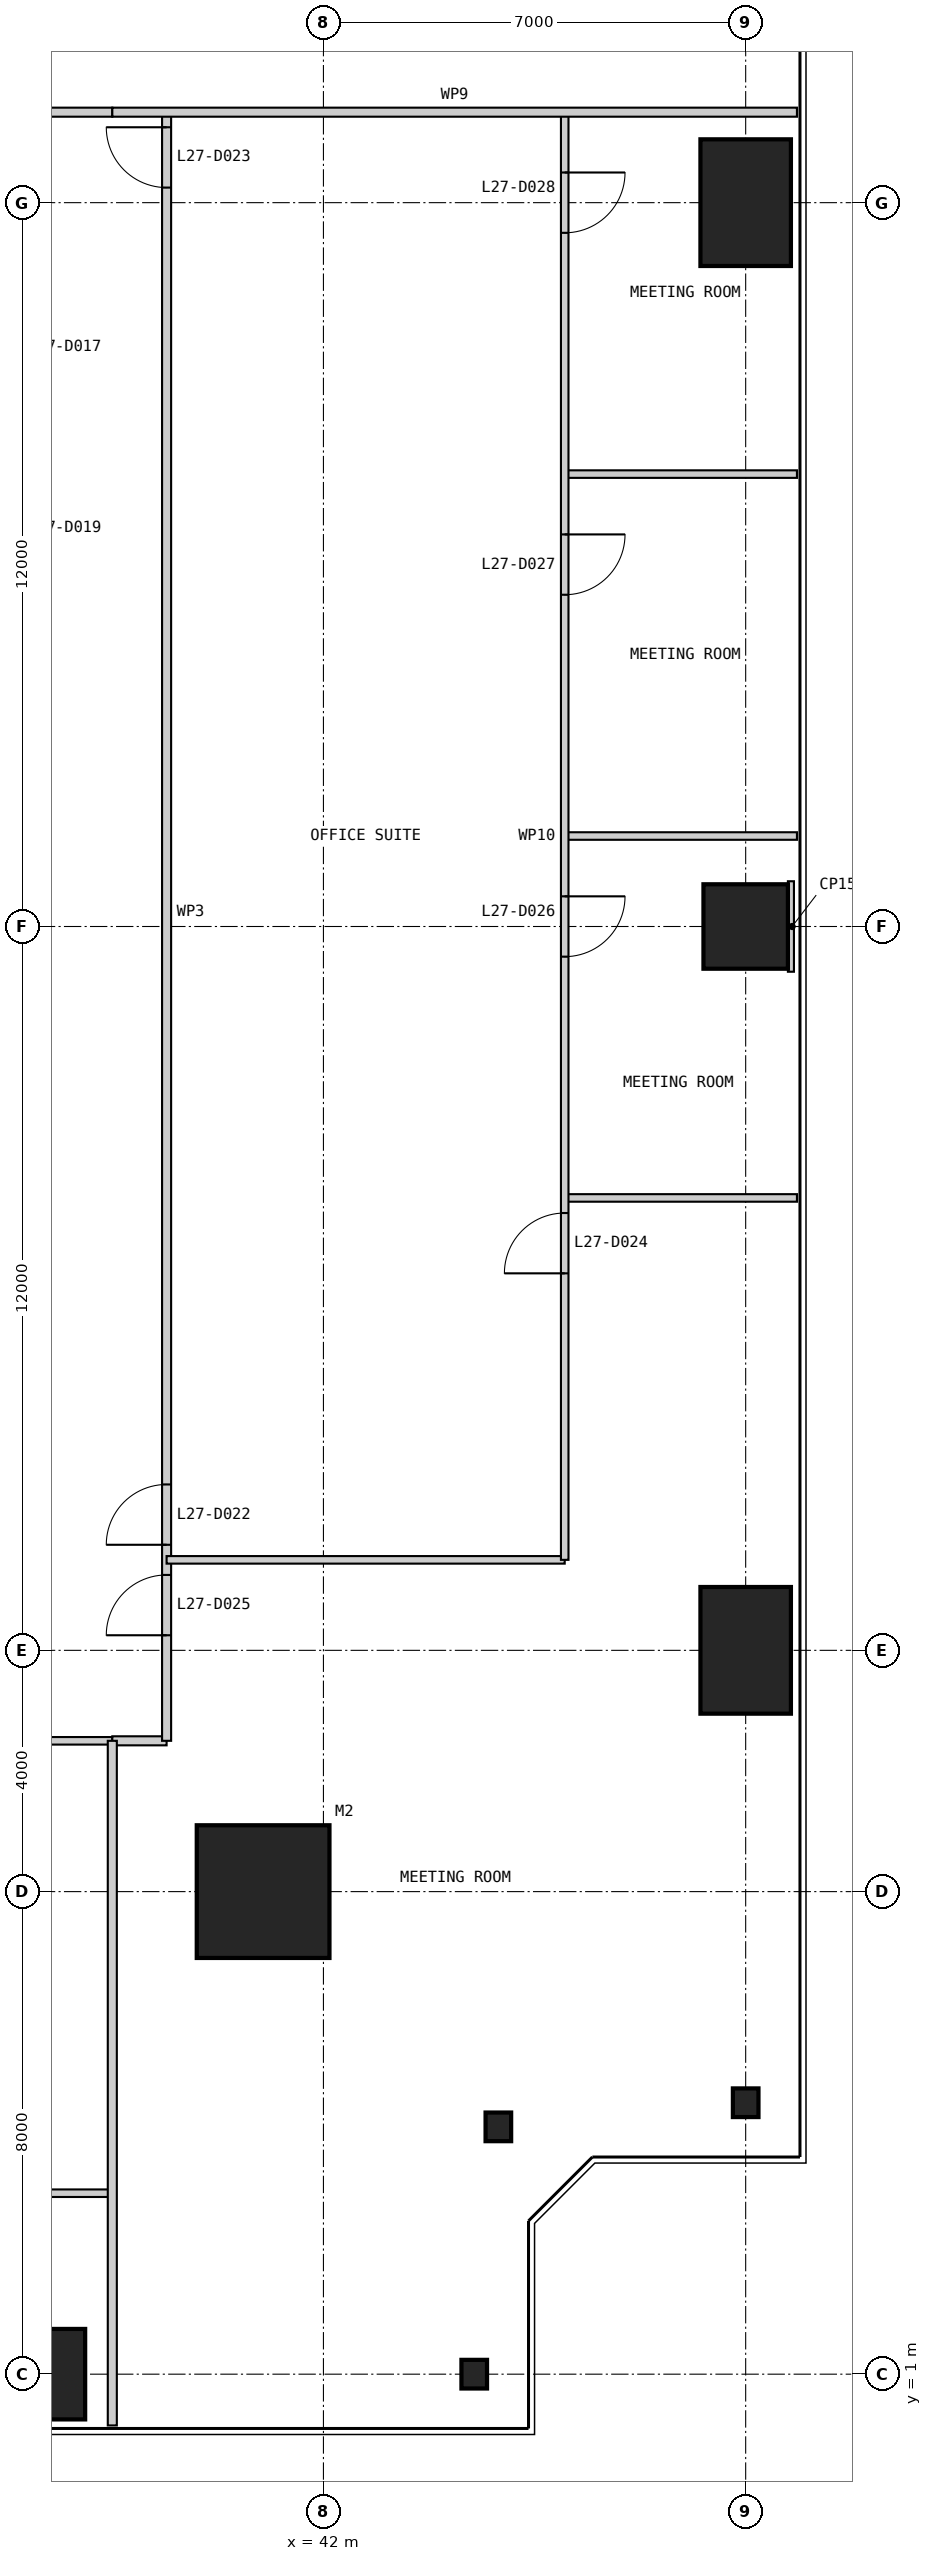
"""IFC4 building model, lengths in metres.
Left out: names, types, materials, properties, quantities, classifications, styles, units other than length and angle.
Written with IfcOpenShell. Run it as: python <this file> out.ifc"""

import sys

from ifc_helpers import new_model, si_unit, direction, frame, frame_2d, origin, origin_2d, place, context, subcontext, project, spatial, rectangle, i_section, extrude, element, fill, save


model = new_model("IFC4")
c1 = context("Model", 3, precision=1e-05, world=origin(), true_north=direction((0.0, 1.0)))
c2 = subcontext(c1, "Body", "Model", "MODEL_VIEW")
j1 = project(units=[si_unit("LENGTHUNIT", "METRE"), si_unit("PLANEANGLEUNIT", "RADIAN")], contexts=[c1])
p1 = place(None, origin())
s1 = spatial("IfcSite", under=j1, at=p1, CompositionType="ELEMENT")
p2 = place(p1, origin())
s2 = spatial("IfcBuilding", under=s1, at=p2, CompositionType="ELEMENT")
p3 = place(p2, frame((0.0, 0.0, 118.4)))
s3 = spatial("IfcBuildingStorey", under=s2, at=p3, CompositionType="ELEMENT", Elevation=118.4)
p4 = place(p3, frame((41.0, 9.0, 0.0), z_axis=(0.0, 0.0, 1.0), x_axis=(1.0, 0.0, 0.0)))
e1 = element("IfcColumn", 1, at=p4, inside=s3, PredefinedType="COLUMN", context=c2, shape_type="SweptSolid", body=[
    extrude(rectangle(XDim=2.2, YDim=2.2, at=origin_2d()), origin(), (0.0, 0.0, 1.0), 4.0),
])
p5 = place(p3, frame((37.0, 1.0, 0.0), z_axis=(0.0, 0.0, 1.0), x_axis=(1.0, 0.0, 0.0)))
e2 = element("IfcColumn", 2, at=p5, inside=s3, PredefinedType="COLUMN", context=c2, shape_type="SweptSolid", body=[
    extrude(rectangle(XDim=2.1, YDim=1.5, at=origin_2d()), origin(), (0.0, 0.0, 1.0), 4.0),
])
for number, where, z_axis, x_axis in (
    (3, (44.5, 1.0, 0.0), (0.0, 0.0, 1.0), (1.0, 0.0, 0.0)),
    (4, (44.9, 5.1, 0.0), (0.0, 0.0, 1.0), (1.0, 0.0, 0.0)),
    (5, (49.0, 5.5, 0.0), (0.0, 0.0, 1.0), (1.0, 0.0, 0.0)),
):
    element("IfcColumn", number, at=place(p3, frame(where, z_axis=z_axis, x_axis=x_axis)), inside=s3, PredefinedType="COLUMN", context=c2, shape_type="SweptSolid", body=[
        extrude(i_section(OverallWidth=0.424, OverallDepth=0.475, WebThickness=0.048, FlangeThickness=0.077, at=origin_2d()), origin(), (0.0, 0.0, 1.0), 4.0),
    ])
p6 = place(p3, frame((49.0, 13.0, 0.0), z_axis=(0.0, 0.0, 1.0), x_axis=(1.0, 0.0, 0.0)))
e6 = element("IfcColumn", 6, at=p6, inside=s3, PredefinedType="COLUMN", context=c2, shape_type="SweptSolid", body=[
    extrude(rectangle(XDim=1.5, YDim=2.1, at=origin_2d()), origin(), (0.0, 0.0, 1.0), 4.0),
])
p7 = place(p3, frame((49.0, 25.0, 0.0), z_axis=(0.0, 0.0, 1.0), x_axis=(1.0, 0.0, 0.0)))
e7 = element("IfcColumn", 7, at=p7, inside=s3, PredefinedType="COLUMN", context=c2, shape_type="SweptSolid", body=[
    extrude(rectangle(XDim=1.4, YDim=1.4, at=origin_2d()), origin(), (0.0, 0.0, 1.0), 4.0),
])
p8 = place(p3, frame((49.0, 37.0, 0.0), z_axis=(0.0, 0.0, 1.0), x_axis=(1.0, 0.0, 0.0)))
e8 = element("IfcColumn", 8, at=p8, inside=s3, PredefinedType="COLUMN", context=c2, shape_type="SweptSolid", body=[
    extrude(rectangle(XDim=1.5, YDim=2.1, at=origin_2d()), origin(), (0.0, 0.0, 1.0), 4.0),
])
p9 = place(p3, frame((32.5, 4.0, 0.0), z_axis=(0.0, 0.0, 1.0), x_axis=(1.0, 0.0, 0.0)))
e9 = element("IfcWall", 9, at=p9, inside=s3, PredefinedType="PARTITIONING", context=c2, shape_type="SweptSolid", body=[
    extrude(rectangle(XDim=6.0, YDim=0.125, at=frame_2d((3.0, 0.0))), origin(), (0.0, 0.0, 1.0), 3.85),
])
p10 = place(p3, frame((35.5, 11.5, 0.0), z_axis=(0.0, 0.0, 1.0), x_axis=(1.0, 0.0, 0.0)))
e10 = element("IfcWall", 10, at=p10, inside=s3, PredefinedType="PARTITIONING", context=c2, shape_type="SweptSolid", body=[
    extrude(rectangle(XDim=3.0, YDim=0.125, at=frame_2d((1.5, 0.0))), origin(), (0.0, 0.0, 1.0), 3.85),
])
p11 = place(p3, frame((38.5, 11.5, 0.0), z_axis=(0.0, 0.0, 1.0), x_axis=(1.0, 0.0, 0.0)))
e11 = element("IfcWall", 11, at=p11, inside=s3, PredefinedType="PARTITIONING", context=c2, shape_type="SweptSolid", body=[
    extrude(rectangle(XDim=0.9, YDim=0.15, at=frame_2d((0.45, 0.0))), origin(), (0.0, 0.0, 1.0), 3.85),
])
p12 = place(p3, frame((39.4, 11.5, 0.0), z_axis=(0.0, 0.0, 1.0), x_axis=(0.0, 1.0, 0.0)))
e12 = element("IfcWall", 12, at=p12, inside=s3, PredefinedType="PARTITIONING", context=c2, shape_type="SweptSolid", body=[
    extrude(rectangle(XDim=27.0, YDim=0.15, at=frame_2d((13.5, 0.0))), origin(), (0.0, 0.0, 1.0), 3.85),
])
p13 = place(p12, frame((3.25, 0.0, 0.0)))
e13 = element("IfcOpeningElement", 13, at=p13, cuts=e12, PredefinedType="OPENING", context=c2, shape_type="SweptSolid", body=[
    extrude(rectangle(XDim=1.0, YDim=2.2, at=frame_2d((0.5, 1.1))), frame((0.0, 0.085, 0.0), z_axis=(0.0, -1.0, 0.0), x_axis=(1.0, 0.0, 0.0)), (0.0, 0.0, 1.0), 0.17),
])
p14 = place(p12, frame((25.75, 0.0, 0.0)))
e14 = element("IfcOpeningElement", 14, at=p14, cuts=e12, PredefinedType="OPENING", context=c2, shape_type="SweptSolid", body=[
    extrude(rectangle(XDim=1.0, YDim=2.2, at=frame_2d((0.5, 1.1))), frame((0.0, 0.085, 0.0), z_axis=(0.0, -1.0, 0.0), x_axis=(1.0, 0.0, 0.0)), (0.0, 0.0, 1.0), 0.17),
])
p15 = place(p12, frame((1.75, 0.0, 0.0)))
e15 = element("IfcOpeningElement", 15, at=p15, cuts=e12, PredefinedType="OPENING", context=c2, shape_type="SweptSolid", body=[
    extrude(rectangle(XDim=1.0, YDim=2.2, at=frame_2d((0.5, 1.1))), frame((0.0, 0.085, 0.0), z_axis=(0.0, -1.0, 0.0), x_axis=(1.0, 0.0, 0.0)), (0.0, 0.0, 1.0), 0.17),
])
p16 = place(p3, frame((38.5, 0.15, 0.0), z_axis=(0.0, 0.0, 1.0), x_axis=(0.0, 1.0, 0.0)))
e16 = element("IfcWall", 16, at=p16, inside=s3, PredefinedType="PARTITIONING", context=c2, shape_type="SweptSolid", body=[
    extrude(rectangle(XDim=11.35, YDim=0.15, at=frame_2d((5.675, 0.0))), origin(), (0.0, 0.0, 1.0), 3.85),
])
p17 = place(p3, frame((46.0, 14.5, 0.0), z_axis=(0.0, 0.0, 1.0), x_axis=(-1.0, 0.0, 0.0)))
e17 = element("IfcWall", 17, at=p17, inside=s3, PredefinedType="PARTITIONING", context=c2, shape_type="SweptSolid", body=[
    extrude(rectangle(XDim=6.6, YDim=0.125, at=frame_2d((3.3, 0.0))), origin(), (0.0, 0.0, 1.0), 3.85),
])
for number, where, z_axis, x_axis in (
    (18, (49.85, 20.5, 0.0), (0.0, 0.0, 1.0), (-1.0, 0.0, 0.0)),
    (19, (49.85, 26.5, 0.0), (0.0, 0.0, 1.0), (-1.0, 0.0, 0.0)),
    (20, (49.85, 32.5, 0.0), (0.0, 0.0, 1.0), (-1.0, 0.0, 0.0)),
):
    element("IfcWall", number, at=place(p3, frame(where, z_axis=z_axis, x_axis=x_axis)), inside=s3, PredefinedType="PARTITIONING", context=c2, shape_type="SweptSolid", body=[
        extrude(rectangle(XDim=3.85, YDim=0.125, at=frame_2d((1.925, 0.0))), origin(), (0.0, 0.0, 1.0), 3.85),
    ])
p18 = place(p3, frame((46.0, 14.5, 0.0), z_axis=(0.0, 0.0, 1.0), x_axis=(0.0, 1.0, 0.0)))
e21 = element("IfcWall", 21, at=p18, inside=s3, PredefinedType="PARTITIONING", context=c2, shape_type="SweptSolid", body=[
    extrude(rectangle(XDim=24.0, YDim=0.125, at=frame_2d((12.0, 0.0))), origin(), (0.0, 0.0, 1.0), 3.238),
])
p19 = place(p18, frame((4.75, 0.0, 0.0)))
e22 = element("IfcOpeningElement", 22, at=p19, cuts=e21, PredefinedType="OPENING", context=c2, shape_type="SweptSolid", body=[
    extrude(rectangle(XDim=1.0, YDim=2.2, at=frame_2d((0.5, 1.1))), frame((0.0, 0.073, 0.0), z_axis=(0.0, -1.0, 0.0), x_axis=(1.0, 0.0, 0.0)), (0.0, 0.0, 1.0), 0.145),
])
p20 = place(p18, frame((10.0, 0.0, 0.0)))
e23 = element("IfcOpeningElement", 23, at=p20, cuts=e21, PredefinedType="OPENING", context=c2, shape_type="SweptSolid", body=[
    extrude(rectangle(XDim=1.0, YDim=2.2, at=frame_2d((0.5, 1.1))), frame((0.0, 0.073, 0.0), z_axis=(0.0, -1.0, 0.0), x_axis=(1.0, 0.0, 0.0)), (0.0, 0.0, 1.0), 0.145),
])
p21 = place(p18, frame((16.0, 0.0, 0.0)))
e24 = element("IfcOpeningElement", 24, at=p21, cuts=e21, PredefinedType="OPENING", context=c2, shape_type="SweptSolid", body=[
    extrude(rectangle(XDim=1.0, YDim=2.2, at=frame_2d((0.5, 1.1))), frame((0.0, 0.073, 0.0), z_axis=(0.0, -1.0, 0.0), x_axis=(1.0, 0.0, 0.0)), (0.0, 0.0, 1.0), 0.145),
])
p22 = place(p18, frame((22.0, 0.0, 0.0)))
e25 = element("IfcOpeningElement", 25, at=p22, cuts=e21, PredefinedType="OPENING", context=c2, shape_type="SweptSolid", body=[
    extrude(rectangle(XDim=1.0, YDim=2.2, at=frame_2d((0.5, 1.1))), frame((0.0, 0.073, 0.0), z_axis=(0.0, -1.0, 0.0), x_axis=(1.0, 0.0, 0.0)), (0.0, 0.0, 1.0), 0.145),
])
p23 = place(p3, frame((38.5, 38.5, 0.0), z_axis=(0.0, 0.0, 1.0), x_axis=(-1.0, 0.0, 0.0)))
e26 = element("IfcWall", 26, at=p23, inside=s3, PredefinedType="PARTITIONING", context=c2, shape_type="SweptSolid", body=[
    extrude(rectangle(XDim=27.0, YDim=0.15, at=frame_2d((13.5, 0.0))), origin(), (0.0, 0.0, 1.0), 3.85),
])
p24 = place(p23, frame((2.5, 0.0, 0.0)))
e27 = element("IfcOpeningElement", 27, at=p24, cuts=e26, PredefinedType="OPENING", context=c2, shape_type="SweptSolid", body=[
    extrude(rectangle(XDim=1.0, YDim=2.2, at=frame_2d((0.5, 1.1))), frame((0.0, 0.085, 0.0), z_axis=(0.0, -1.0, 0.0), x_axis=(1.0, 0.0, 0.0)), (0.0, 0.0, 1.0), 0.17),
])
p25 = place(p23, frame((16.0, 0.0, 0.0)))
e28 = element("IfcOpeningElement", 28, at=p25, cuts=e26, PredefinedType="OPENING", context=c2, shape_type="SweptSolid", body=[
    extrude(rectangle(XDim=1.0, YDim=2.2, at=frame_2d((0.5, 1.1))), frame((0.0, 0.085, 0.0), z_axis=(0.0, -1.0, 0.0), x_axis=(1.0, 0.0, 0.0)), (0.0, 0.0, 1.0), 0.17),
])
p26 = place(p3, frame((49.85, 38.5, 0.0), z_axis=(0.0, 0.0, 1.0), x_axis=(-1.0, 0.0, 0.0)))
e29 = element("IfcWall", 29, at=p26, inside=s3, PredefinedType="PARTITIONING", context=c2, shape_type="SweptSolid", body=[
    extrude(rectangle(XDim=11.35, YDim=0.15, at=frame_2d((5.675, 0.0))), origin(), (0.0, 0.0, 1.0), 3.85),
])
p27 = place(p3, frame((49.8, 25.0, 0.0), z_axis=(0.0, 0.0, 1.0), x_axis=(-1.0, 0.0, 0.0)))
e30 = element("IfcWall", 30, at=p27, inside=s3, PredefinedType="PARTITIONING", context=c2, shape_type="SweptSolid", body=[
    extrude(rectangle(XDim=0.1, YDim=1.5, at=frame_2d((0.05, 0.0))), origin(), (0.0, 0.0, 1.0), 3.85),
])
p28 = place(p13, origin())
e31 = element("IfcDoor", 31, at=p28, inside=s3, OperationType="SINGLE_SWING_LEFT", PredefinedType="DOOR", context=c2, shape_type="SweptSolid", body=[
    extrude(rectangle(XDim=1.0, YDim=2.2, at=frame_2d((0.5, 1.1))), frame((0.0, 0.025, 0.0), z_axis=(0.0, -1.0, 0.0), x_axis=(1.0, 0.0, 0.0)), (0.0, 0.0, 1.0), 0.05),
])
fill(e13, e31)
p29 = place(p14, origin())
e32 = element("IfcDoor", 32, at=p29, inside=s3, OperationType="SINGLE_SWING_RIGHT", PredefinedType="DOOR", context=c2, shape_type="SweptSolid", body=[
    extrude(rectangle(XDim=1.0, YDim=2.2, at=frame_2d((0.5, 1.1))), frame((0.0, 0.025, 0.0), z_axis=(0.0, -1.0, 0.0), x_axis=(1.0, 0.0, 0.0)), (0.0, 0.0, 1.0), 0.05),
])
fill(e14, e32)
p30 = place(p19, origin())
e33 = element("IfcDoor", 33, at=p30, inside=s3, OperationType="SINGLE_SWING_LEFT", PredefinedType="DOOR", context=c2, shape_type="SweptSolid", body=[
    extrude(rectangle(XDim=1.0, YDim=2.2, at=frame_2d((0.5, 1.1))), frame((0.0, 0.025, 0.0), z_axis=(0.0, -1.0, 0.0), x_axis=(1.0, 0.0, 0.0)), (0.0, 0.0, 1.0), 0.05),
])
fill(e22, e33)
p31 = place(p15, origin())
e34 = element("IfcDoor", 34, at=p31, inside=s3, OperationType="SINGLE_SWING_LEFT", PredefinedType="DOOR", context=c2, shape_type="SweptSolid", body=[
    extrude(rectangle(XDim=1.0, YDim=2.2, at=frame_2d((0.5, 1.1))), frame((0.0, 0.025, 0.0), z_axis=(0.0, -1.0, 0.0), x_axis=(1.0, 0.0, 0.0)), (0.0, 0.0, 1.0), 0.05),
])
fill(e15, e34)
p32 = place(p20, frame((1.0, 0.0, 0.0), z_axis=(0.0, 0.0, 1.0), x_axis=(-1.0, 0.0, 0.0)))
e35 = element("IfcDoor", 35, at=p32, inside=s3, OperationType="SINGLE_SWING_LEFT", PredefinedType="DOOR", context=c2, shape_type="SweptSolid", body=[
    extrude(rectangle(XDim=1.0, YDim=2.2, at=frame_2d((0.5, 1.1))), frame((0.0, 0.025, 0.0), z_axis=(0.0, -1.0, 0.0), x_axis=(1.0, 0.0, 0.0)), (0.0, 0.0, 1.0), 0.05),
])
fill(e23, e35)
p33 = place(p21, frame((1.0, 0.0, 0.0), z_axis=(0.0, 0.0, 1.0), x_axis=(-1.0, 0.0, 0.0)))
e36 = element("IfcDoor", 36, at=p33, inside=s3, OperationType="SINGLE_SWING_LEFT", PredefinedType="DOOR", context=c2, shape_type="SweptSolid", body=[
    extrude(rectangle(XDim=1.0, YDim=2.2, at=frame_2d((0.5, 1.1))), frame((0.0, 0.025, 0.0), z_axis=(0.0, -1.0, 0.0), x_axis=(1.0, 0.0, 0.0)), (0.0, 0.0, 1.0), 0.05),
])
fill(e24, e36)
p34 = place(p22, frame((1.0, 0.0, 0.0), z_axis=(0.0, 0.0, 1.0), x_axis=(-1.0, 0.0, 0.0)))
e37 = element("IfcDoor", 37, at=p34, inside=s3, OperationType="SINGLE_SWING_LEFT", PredefinedType="DOOR", context=c2, shape_type="SweptSolid", body=[
    extrude(rectangle(XDim=1.0, YDim=2.2, at=frame_2d((0.5, 1.1))), frame((0.0, 0.025, 0.0), z_axis=(0.0, -1.0, 0.0), x_axis=(1.0, 0.0, 0.0)), (0.0, 0.0, 1.0), 0.05),
])
fill(e25, e37)
save(model, sys.argv[1])
